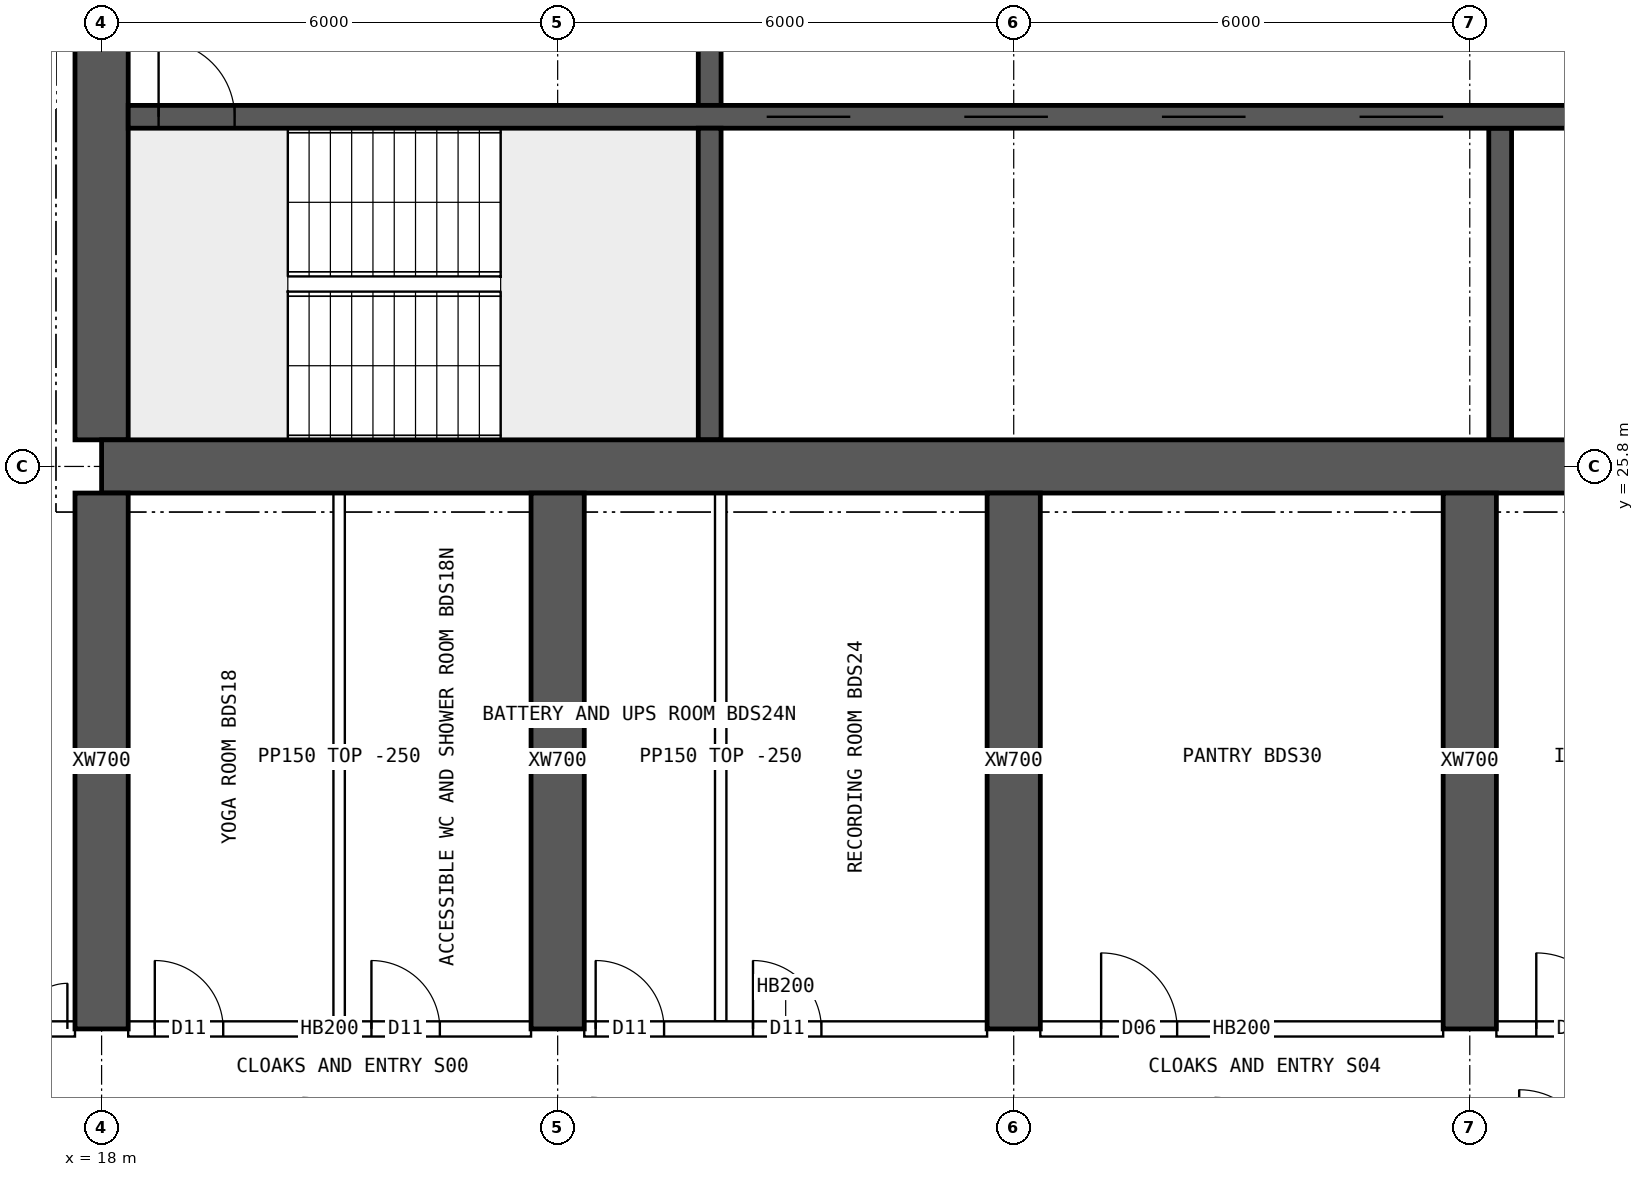
"""IFC4 building model, lengths in metres.
Left out: names, types, materials, properties, quantities, classifications, styles, units other than length and angle.
Written with IfcOpenShell. Run it as: python <this file> out.ifc"""

import sys

from ifc_helpers import new_model, si_unit, direction, frame, frame_2d, origin, place, context, subcontext, project, spatial, rectangle, extrude, element, fill, save


model = new_model("IFC4")
c1 = context("Model", 3, precision=1e-05, world=origin(), true_north=direction((0.0, 1.0)))
c2 = subcontext(c1, "Body", "Model", "MODEL_VIEW")
j1 = project(units=[si_unit("LENGTHUNIT", "METRE"), si_unit("PLANEANGLEUNIT", "RADIAN")], contexts=[c1])
p1 = place(None, origin())
s1 = spatial("IfcSite", under=j1, at=p1, CompositionType="ELEMENT")
p2 = place(p1, origin())
s2 = spatial("IfcBuilding", under=s1, at=p2, CompositionType="ELEMENT")
p3 = place(p2, frame((0.0, 0.0, 231.55)))
s3 = spatial("IfcBuildingStorey", under=s2, at=p3, CompositionType="ELEMENT", Elevation=231.55)
p4 = place(p3, frame((18.0, 25.8, 0.0), z_axis=(0.0, 0.0, 1.0), x_axis=(1.0, 0.0, 0.0)))
e1 = element("IfcWall", 1, at=p4, inside=s3, PredefinedType="SHEAR", context=c2, shape_type="SweptSolid", body=[
    extrude(rectangle(XDim=48.0, YDim=0.7, at=frame_2d((24.0, 0.0))), origin(), (0.0, 0.0, 1.0), 3.75),
])
p5 = place(p3, frame((18.0, 26.15, 0.0), z_axis=(0.0, 0.0, 1.0), x_axis=(0.0, 1.0, 0.0)))
e2 = element("IfcWall", 2, at=p5, inside=s3, PredefinedType="SHEAR", context=c2, shape_type="SweptSolid", body=[
    extrude(rectangle(XDim=11.7, YDim=0.7, at=frame_2d((5.85, 0.0))), origin(), (0.0, 0.0, 1.0), 3.75),
])
p6 = place(p5, frame((5.15, 0.0, 0.0)))
e3 = element("IfcOpeningElement", 3, at=p6, cuts=e2, PredefinedType="OPENING", context=c2, shape_type="SweptSolid", body=[
    extrude(rectangle(XDim=1.2, YDim=2.1, at=frame_2d((0.6, 1.05))), frame((0.0, 0.36, 0.0), z_axis=(0.0, -1.0, 0.0), x_axis=(1.0, 0.0, 0.0)), (0.0, 0.0, 1.0), 0.72),
])
p7 = place(p3, frame((18.35, 30.4, 0.0), z_axis=(0.0, 0.0, 1.0), x_axis=(1.0, 0.0, 0.0)))
e4 = element("IfcWall", 4, at=p7, inside=s3, PredefinedType="SHEAR", context=c2, shape_type="SweptSolid", body=[
    extrude(rectangle(XDim=47.3, YDim=0.3, at=frame_2d((23.65, 0.0))), origin(), (0.0, 0.0, 1.0), 3.75),
])
p8 = place(p7, frame((0.4, 0.0, 0.0)))
e5 = element("IfcOpeningElement", 5, at=p8, cuts=e4, PredefinedType="OPENING", context=c2, shape_type="SweptSolid", body=[
    extrude(rectangle(XDim=1.0, YDim=2.1, at=frame_2d((0.5, 1.05))), frame((0.0, 0.16, 0.0), z_axis=(0.0, -1.0, 0.0), x_axis=(1.0, 0.0, 0.0)), (0.0, 0.0, 1.0), 0.32),
])
p9 = place(p7, frame((45.9, 0.0, 0.0)))
e6 = element("IfcOpeningElement", 6, at=p9, cuts=e4, PredefinedType="OPENING", context=c2, shape_type="SweptSolid", body=[
    extrude(rectangle(XDim=1.0, YDim=2.1, at=frame_2d((0.5, 1.05))), frame((0.0, 0.16, 0.0), z_axis=(0.0, -1.0, 0.0), x_axis=(1.0, 0.0, 0.0)), (0.0, 0.0, 1.0), 0.32),
])
p10 = place(p7, frame((8.4, 0.0, 0.0)))
e7 = element("IfcOpeningElement", 7, at=p10, cuts=e4, PredefinedType="OPENING", context=c2, shape_type="SweptSolid", body=[
    extrude(rectangle(XDim=1.1, YDim=2.1, at=frame_2d((0.55, 1.05))), frame((0.0, 0.16, 0.0), z_axis=(0.0, -1.0, 0.0), x_axis=(1.0, 0.0, 0.0)), (0.0, 0.0, 1.0), 0.32),
])
p11 = place(p7, frame((11.0, 0.0, 0.0)))
e8 = element("IfcOpeningElement", 8, at=p11, cuts=e4, PredefinedType="OPENING", context=c2, shape_type="SweptSolid", body=[
    extrude(rectangle(XDim=1.1, YDim=2.1, at=frame_2d((0.55, 1.05))), frame((0.0, 0.16, 0.0), z_axis=(0.0, -1.0, 0.0), x_axis=(1.0, 0.0, 0.0)), (0.0, 0.0, 1.0), 0.32),
])
p12 = place(p7, frame((13.6, 0.0, 0.0)))
e9 = element("IfcOpeningElement", 9, at=p12, cuts=e4, PredefinedType="OPENING", context=c2, shape_type="SweptSolid", body=[
    extrude(rectangle(XDim=1.1, YDim=2.1, at=frame_2d((0.55, 1.05))), frame((0.0, 0.16, 0.0), z_axis=(0.0, -1.0, 0.0), x_axis=(1.0, 0.0, 0.0)), (0.0, 0.0, 1.0), 0.32),
])
p13 = place(p7, frame((16.2, 0.0, 0.0)))
e10 = element("IfcOpeningElement", 10, at=p13, cuts=e4, PredefinedType="OPENING", context=c2, shape_type="SweptSolid", body=[
    extrude(rectangle(XDim=1.1, YDim=2.1, at=frame_2d((0.55, 1.05))), frame((0.0, 0.16, 0.0), z_axis=(0.0, -1.0, 0.0), x_axis=(1.0, 0.0, 0.0)), (0.0, 0.0, 1.0), 0.32),
])
p14 = place(p7, frame((18.975, 0.0, 0.0)))
e11 = element("IfcOpeningElement", 11, at=p14, cuts=e4, PredefinedType="OPENING", context=c2, shape_type="SweptSolid", body=[
    extrude(rectangle(XDim=0.9, YDim=2.1, at=frame_2d((0.45, 1.05))), frame((0.0, 0.16, 0.0), z_axis=(0.0, -1.0, 0.0), x_axis=(1.0, 0.0, 0.0)), (0.0, 0.0, 1.0), 0.32),
])
p15 = place(p7, frame((24.475, 0.0, 0.0)))
e12 = element("IfcOpeningElement", 12, at=p15, cuts=e4, PredefinedType="OPENING", context=c2, shape_type="SweptSolid", body=[
    extrude(rectangle(XDim=0.9, YDim=2.1, at=frame_2d((0.45, 1.05))), frame((0.0, 0.16, 0.0), z_axis=(0.0, -1.0, 0.0), x_axis=(1.0, 0.0, 0.0)), (0.0, 0.0, 1.0), 0.32),
])
p16 = place(p7, frame((30.267, 0.0, 0.0)))
e13 = element("IfcOpeningElement", 13, at=p16, cuts=e4, PredefinedType="OPENING", context=c2, shape_type="SweptSolid", body=[
    extrude(rectangle(XDim=1.1, YDim=2.1, at=frame_2d((0.55, 1.05))), frame((0.0, 0.16, 0.0), z_axis=(0.0, -1.0, 0.0), x_axis=(1.0, 0.0, 0.0)), (0.0, 0.0, 1.0), 0.32),
])
p17 = place(p7, frame((33.8, 0.0, 0.0)))
e14 = element("IfcOpeningElement", 14, at=p17, cuts=e4, PredefinedType="OPENING", context=c2, shape_type="SweptSolid", body=[
    extrude(rectangle(XDim=1.1, YDim=2.1, at=frame_2d((0.55, 1.05))), frame((0.0, 0.16, 0.0), z_axis=(0.0, -1.0, 0.0), x_axis=(1.0, 0.0, 0.0)), (0.0, 0.0, 1.0), 0.32),
])
p18 = place(p7, frame((37.333, 0.0, 0.0)))
e15 = element("IfcOpeningElement", 15, at=p18, cuts=e4, PredefinedType="OPENING", context=c2, shape_type="SweptSolid", body=[
    extrude(rectangle(XDim=1.1, YDim=2.1, at=frame_2d((0.55, 1.05))), frame((0.0, 0.16, 0.0), z_axis=(0.0, -1.0, 0.0), x_axis=(1.0, 0.0, 0.0)), (0.0, 0.0, 1.0), 0.32),
])
p19 = place(p3, frame((26.0, 26.15, 0.0), z_axis=(0.0, 0.0, 1.0), x_axis=(0.0, 1.0, 0.0)))
e16 = element("IfcWall", 16, at=p19, inside=s3, PredefinedType="SHEAR", context=c2, shape_type="SweptSolid", body=[
    extrude(rectangle(XDim=4.1, YDim=0.3, at=frame_2d((2.05, 0.0))), origin(), (0.0, 0.0, 1.0), 3.75),
])
p20 = place(p3, frame((26.0, 30.55, 0.0), z_axis=(0.0, 0.0, 1.0), x_axis=(0.0, 1.0, 0.0)))
e17 = element("IfcWall", 17, at=p20, inside=s3, PredefinedType="SHEAR", context=c2, shape_type="SweptSolid", body=[
    extrude(rectangle(XDim=3.9, YDim=0.3, at=frame_2d((1.95, 0.0))), origin(), (0.0, 0.0, 1.0), 3.75),
])
p21 = place(p20, frame((1.4, 0.0, 0.0)))
e18 = element("IfcOpeningElement", 18, at=p21, cuts=e17, PredefinedType="OPENING", context=c2, shape_type="SweptSolid", body=[
    extrude(rectangle(XDim=1.2, YDim=2.1, at=frame_2d((0.6, 1.05))), frame((0.0, 0.16, 0.0), z_axis=(0.0, -1.0, 0.0), x_axis=(1.0, 0.0, 0.0)), (0.0, 0.0, 1.0), 0.32),
])
p22 = place(p3, frame((36.4, 26.15, 0.0), z_axis=(0.0, 0.0, 1.0), x_axis=(0.0, 1.0, 0.0)))
e19 = element("IfcWall", 19, at=p22, inside=s3, PredefinedType="SHEAR", context=c2, shape_type="SweptSolid", body=[
    extrude(rectangle(XDim=4.1, YDim=0.3, at=frame_2d((2.05, 0.0))), origin(), (0.0, 0.0, 1.0), 3.75),
])
for number, where, z_axis, x_axis in (
    (20, (18.0, 18.4, 0.0), (0.0, 0.0, 1.0), (0.0, 1.0, 0.0)),
    (21, (24.0, 18.4, 0.0), (0.0, 0.0, 1.0), (0.0, 1.0, 0.0)),
    (22, (30.0, 18.4, 0.0), (0.0, 0.0, 1.0), (0.0, 1.0, 0.0)),
    (23, (36.0, 18.4, 0.0), (0.0, 0.0, 1.0), (0.0, 1.0, 0.0)),
):
    element("IfcWall", number, at=place(p3, frame(where, z_axis=z_axis, x_axis=x_axis)), inside=s3, PredefinedType="SHEAR", context=c2, shape_type="SweptSolid", body=[
        extrude(rectangle(XDim=7.05, YDim=0.7, at=frame_2d((3.525, 0.0))), origin(), (0.0, 0.0, 1.0), 3.75),
    ])
p23 = place(p3, frame((15.6, 18.4, 0.0), z_axis=(0.0, 0.0, 1.0), x_axis=(1.0, 0.0, 0.0)))
e24 = element("IfcWall", 24, at=p23, inside=s3, PredefinedType="SOLIDWALL", context=c2, shape_type="SweptSolid", body=[
    extrude(rectangle(XDim=2.05, YDim=0.2, at=frame_2d((1.025, 0.0))), origin(), (0.0, 0.0, 1.0), 3.5),
])
p24 = place(p23, frame((0.75, 0.0, 0.0)))
e25 = element("IfcOpeningElement", 25, at=p24, cuts=e24, PredefinedType="OPENING", context=c2, shape_type="SweptSolid", body=[
    extrude(rectangle(XDim=1.2, YDim=2.1, at=frame_2d((0.6, 1.05))), frame((0.0, 0.11, 0.0), z_axis=(0.0, -1.0, 0.0), x_axis=(1.0, 0.0, 0.0)), (0.0, 0.0, 1.0), 0.22),
])
p25 = place(p3, frame((18.35, 18.4, 0.0), z_axis=(0.0, 0.0, 1.0), x_axis=(1.0, 0.0, 0.0)))
e26 = element("IfcWall", 26, at=p25, inside=s3, PredefinedType="SOLIDWALL", context=c2, shape_type="SweptSolid", body=[
    extrude(rectangle(XDim=5.3, YDim=0.2, at=frame_2d((2.65, 0.0))), origin(), (0.0, 0.0, 1.0), 3.5),
])
p26 = place(p25, frame((0.35, 0.0, 0.0)))
e27 = element("IfcOpeningElement", 27, at=p26, cuts=e26, PredefinedType="OPENING", context=c2, shape_type="SweptSolid", body=[
    extrude(rectangle(XDim=0.9, YDim=2.1, at=frame_2d((0.45, 1.05))), frame((0.0, 0.11, 0.0), z_axis=(0.0, -1.0, 0.0), x_axis=(1.0, 0.0, 0.0)), (0.0, 0.0, 1.0), 0.22),
])
p27 = place(p25, frame((3.2, 0.0, 0.0)))
e28 = element("IfcOpeningElement", 28, at=p27, cuts=e26, PredefinedType="OPENING", context=c2, shape_type="SweptSolid", body=[
    extrude(rectangle(XDim=0.9, YDim=2.1, at=frame_2d((0.45, 1.05))), frame((0.0, 0.11, 0.0), z_axis=(0.0, -1.0, 0.0), x_axis=(1.0, 0.0, 0.0)), (0.0, 0.0, 1.0), 0.22),
])
p28 = place(p3, frame((24.35, 18.4, 0.0), z_axis=(0.0, 0.0, 1.0), x_axis=(1.0, 0.0, 0.0)))
e29 = element("IfcWall", 29, at=p28, inside=s3, PredefinedType="SOLIDWALL", context=c2, shape_type="SweptSolid", body=[
    extrude(rectangle(XDim=5.3, YDim=0.2, at=frame_2d((2.65, 0.0))), origin(), (0.0, 0.0, 1.0), 3.5),
])
p29 = place(p28, frame((0.15, 0.0, 0.0)))
e30 = element("IfcOpeningElement", 30, at=p29, cuts=e29, PredefinedType="OPENING", context=c2, shape_type="SweptSolid", body=[
    extrude(rectangle(XDim=0.9, YDim=2.1, at=frame_2d((0.45, 1.05))), frame((0.0, 0.11, 0.0), z_axis=(0.0, -1.0, 0.0), x_axis=(1.0, 0.0, 0.0)), (0.0, 0.0, 1.0), 0.22),
])
p30 = place(p28, frame((2.22, 0.0, 0.0)))
e31 = element("IfcOpeningElement", 31, at=p30, cuts=e29, PredefinedType="OPENING", context=c2, shape_type="SweptSolid", body=[
    extrude(rectangle(XDim=0.9, YDim=2.1, at=frame_2d((0.45, 1.05))), frame((0.0, 0.11, 0.0), z_axis=(0.0, -1.0, 0.0), x_axis=(1.0, 0.0, 0.0)), (0.0, 0.0, 1.0), 0.22),
])
p31 = place(p3, frame((30.35, 18.4, 0.0), z_axis=(0.0, 0.0, 1.0), x_axis=(1.0, 0.0, 0.0)))
e32 = element("IfcWall", 32, at=p31, inside=s3, PredefinedType="SOLIDWALL", context=c2, shape_type="SweptSolid", body=[
    extrude(rectangle(XDim=5.3, YDim=0.2, at=frame_2d((2.65, 0.0))), origin(), (0.0, 0.0, 1.0), 3.5),
])
p32 = place(p31, frame((0.8, 0.0, 0.0)))
e33 = element("IfcOpeningElement", 33, at=p32, cuts=e32, PredefinedType="OPENING", context=c2, shape_type="SweptSolid", body=[
    extrude(rectangle(XDim=1.0, YDim=2.1, at=frame_2d((0.5, 1.05))), frame((0.0, 0.11, 0.0), z_axis=(0.0, -1.0, 0.0), x_axis=(1.0, 0.0, 0.0)), (0.0, 0.0, 1.0), 0.22),
])
p33 = place(p3, frame((36.35, 18.4, 0.0), z_axis=(0.0, 0.0, 1.0), x_axis=(1.0, 0.0, 0.0)))
e34 = element("IfcWall", 34, at=p33, inside=s3, PredefinedType="SOLIDWALL", context=c2, shape_type="SweptSolid", body=[
    extrude(rectangle(XDim=5.3, YDim=0.2, at=frame_2d((2.65, 0.0))), origin(), (0.0, 0.0, 1.0), 3.5),
])
p34 = place(p33, frame((0.525, 0.0, 0.0)))
e35 = element("IfcOpeningElement", 35, at=p34, cuts=e34, PredefinedType="OPENING", context=c2, shape_type="SweptSolid", body=[
    extrude(rectangle(XDim=1.0, YDim=2.1, at=frame_2d((0.5, 1.05))), frame((0.0, 0.11, 0.0), z_axis=(0.0, -1.0, 0.0), x_axis=(1.0, 0.0, 0.0)), (0.0, 0.0, 1.0), 0.22),
])
for number, where, z_axis, x_axis in (
    (36, (21.125, 18.5, 0.0), (0.0, 0.0, 1.0), (0.0, 1.0, 0.0)),
    (37, (26.145, 18.5, 0.0), (0.0, 0.0, 1.0), (0.0, 1.0, 0.0)),
):
    element("IfcWall", number, at=place(p3, frame(where, z_axis=z_axis, x_axis=x_axis)), inside=s3, PredefinedType="PARTITIONING", context=c2, shape_type="SweptSolid", body=[
        extrude(rectangle(XDim=6.95, YDim=0.15, at=frame_2d((3.475, 0.0))), origin(), (0.0, 0.0, 1.0), 3.5),
    ])
p35 = place(p8, origin())
e38 = element("IfcDoor", 38, at=p35, inside=s3, OperationType="SINGLE_SWING_LEFT", PredefinedType="DOOR", context=c2, shape_type="SweptSolid", body=[
    extrude(rectangle(XDim=1.0, YDim=2.1, at=frame_2d((0.5, 1.05))), frame((0.0, 0.025, 0.0), z_axis=(0.0, -1.0, 0.0), x_axis=(1.0, 0.0, 0.0)), (0.0, 0.0, 1.0), 0.05),
])
fill(e5, e38)
p36 = place(p10, origin())
e39 = element("IfcDoor", 39, at=p36, inside=s3, OperationType="DOUBLE_DOOR_SLIDING", PredefinedType="DOOR", context=c2, shape_type="SweptSolid", body=[
    extrude(rectangle(XDim=1.1, YDim=2.1, at=frame_2d((0.55, 1.05))), frame((0.0, 0.025, 0.0), z_axis=(0.0, -1.0, 0.0), x_axis=(1.0, 0.0, 0.0)), (0.0, 0.0, 1.0), 0.05),
])
fill(e7, e39)
p37 = place(p11, origin())
e40 = element("IfcDoor", 40, at=p37, inside=s3, OperationType="DOUBLE_DOOR_SLIDING", PredefinedType="DOOR", context=c2, shape_type="SweptSolid", body=[
    extrude(rectangle(XDim=1.1, YDim=2.1, at=frame_2d((0.55, 1.05))), frame((0.0, 0.025, 0.0), z_axis=(0.0, -1.0, 0.0), x_axis=(1.0, 0.0, 0.0)), (0.0, 0.0, 1.0), 0.05),
])
fill(e8, e40)
p38 = place(p12, origin())
e41 = element("IfcDoor", 41, at=p38, inside=s3, OperationType="DOUBLE_DOOR_SLIDING", PredefinedType="DOOR", context=c2, shape_type="SweptSolid", body=[
    extrude(rectangle(XDim=1.1, YDim=2.1, at=frame_2d((0.55, 1.05))), frame((0.0, 0.025, 0.0), z_axis=(0.0, -1.0, 0.0), x_axis=(1.0, 0.0, 0.0)), (0.0, 0.0, 1.0), 0.05),
])
fill(e9, e41)
p39 = place(p13, origin())
e42 = element("IfcDoor", 42, at=p39, inside=s3, OperationType="DOUBLE_DOOR_SLIDING", PredefinedType="DOOR", context=c2, shape_type="SweptSolid", body=[
    extrude(rectangle(XDim=1.1, YDim=2.1, at=frame_2d((0.55, 1.05))), frame((0.0, 0.025, 0.0), z_axis=(0.0, -1.0, 0.0), x_axis=(1.0, 0.0, 0.0)), (0.0, 0.0, 1.0), 0.05),
])
fill(e10, e42)
p40 = place(p24, origin())
e43 = element("IfcDoor", 43, at=p40, inside=s3, OperationType="DOUBLE_DOOR_SINGLE_SWING", PredefinedType="DOOR", context=c2, shape_type="SweptSolid", body=[
    extrude(rectangle(XDim=1.2, YDim=2.1, at=frame_2d((0.6, 1.05))), frame((0.0, 0.025, 0.0), z_axis=(0.0, -1.0, 0.0), x_axis=(1.0, 0.0, 0.0)), (0.0, 0.0, 1.0), 0.05),
])
fill(e25, e43)
p41 = place(p26, origin())
e44 = element("IfcDoor", 44, at=p41, inside=s3, OperationType="SINGLE_SWING_LEFT", PredefinedType="DOOR", context=c2, shape_type="SweptSolid", body=[
    extrude(rectangle(XDim=0.9, YDim=2.1, at=frame_2d((0.45, 1.05))), frame((0.0, 0.025, 0.0), z_axis=(0.0, -1.0, 0.0), x_axis=(1.0, 0.0, 0.0)), (0.0, 0.0, 1.0), 0.05),
])
fill(e27, e44)
p42 = place(p27, origin())
e45 = element("IfcDoor", 45, at=p42, inside=s3, OperationType="SINGLE_SWING_LEFT", PredefinedType="DOOR", context=c2, shape_type="SweptSolid", body=[
    extrude(rectangle(XDim=0.9, YDim=2.1, at=frame_2d((0.45, 1.05))), frame((0.0, 0.025, 0.0), z_axis=(0.0, -1.0, 0.0), x_axis=(1.0, 0.0, 0.0)), (0.0, 0.0, 1.0), 0.05),
])
fill(e28, e45)
p43 = place(p29, origin())
e46 = element("IfcDoor", 46, at=p43, inside=s3, OperationType="SINGLE_SWING_LEFT", PredefinedType="DOOR", context=c2, shape_type="SweptSolid", body=[
    extrude(rectangle(XDim=0.9, YDim=2.1, at=frame_2d((0.45, 1.05))), frame((0.0, 0.025, 0.0), z_axis=(0.0, -1.0, 0.0), x_axis=(1.0, 0.0, 0.0)), (0.0, 0.0, 1.0), 0.05),
])
fill(e30, e46)
p44 = place(p30, origin())
e47 = element("IfcDoor", 47, at=p44, inside=s3, OperationType="SINGLE_SWING_LEFT", PredefinedType="DOOR", context=c2, shape_type="SweptSolid", body=[
    extrude(rectangle(XDim=0.9, YDim=2.1, at=frame_2d((0.45, 1.05))), frame((0.0, 0.025, 0.0), z_axis=(0.0, -1.0, 0.0), x_axis=(1.0, 0.0, 0.0)), (0.0, 0.0, 1.0), 0.05),
])
fill(e31, e47)
p45 = place(p32, origin())
e48 = element("IfcDoor", 48, at=p45, inside=s3, OperationType="SINGLE_SWING_LEFT", PredefinedType="DOOR", context=c2, shape_type="SweptSolid", body=[
    extrude(rectangle(XDim=1.0, YDim=2.1, at=frame_2d((0.5, 1.05))), frame((0.0, 0.025, 0.0), z_axis=(0.0, -1.0, 0.0), x_axis=(1.0, 0.0, 0.0)), (0.0, 0.0, 1.0), 0.05),
])
fill(e33, e48)
p46 = place(p34, origin())
e49 = element("IfcDoor", 49, at=p46, inside=s3, OperationType="SINGLE_SWING_LEFT", PredefinedType="DOOR", context=c2, shape_type="SweptSolid", body=[
    extrude(rectangle(XDim=1.0, YDim=2.1, at=frame_2d((0.5, 1.05))), frame((0.0, 0.025, 0.0), z_axis=(0.0, -1.0, 0.0), x_axis=(1.0, 0.0, 0.0)), (0.0, 0.0, 1.0), 0.05),
])
fill(e35, e49)
save(model, sys.argv[1])
